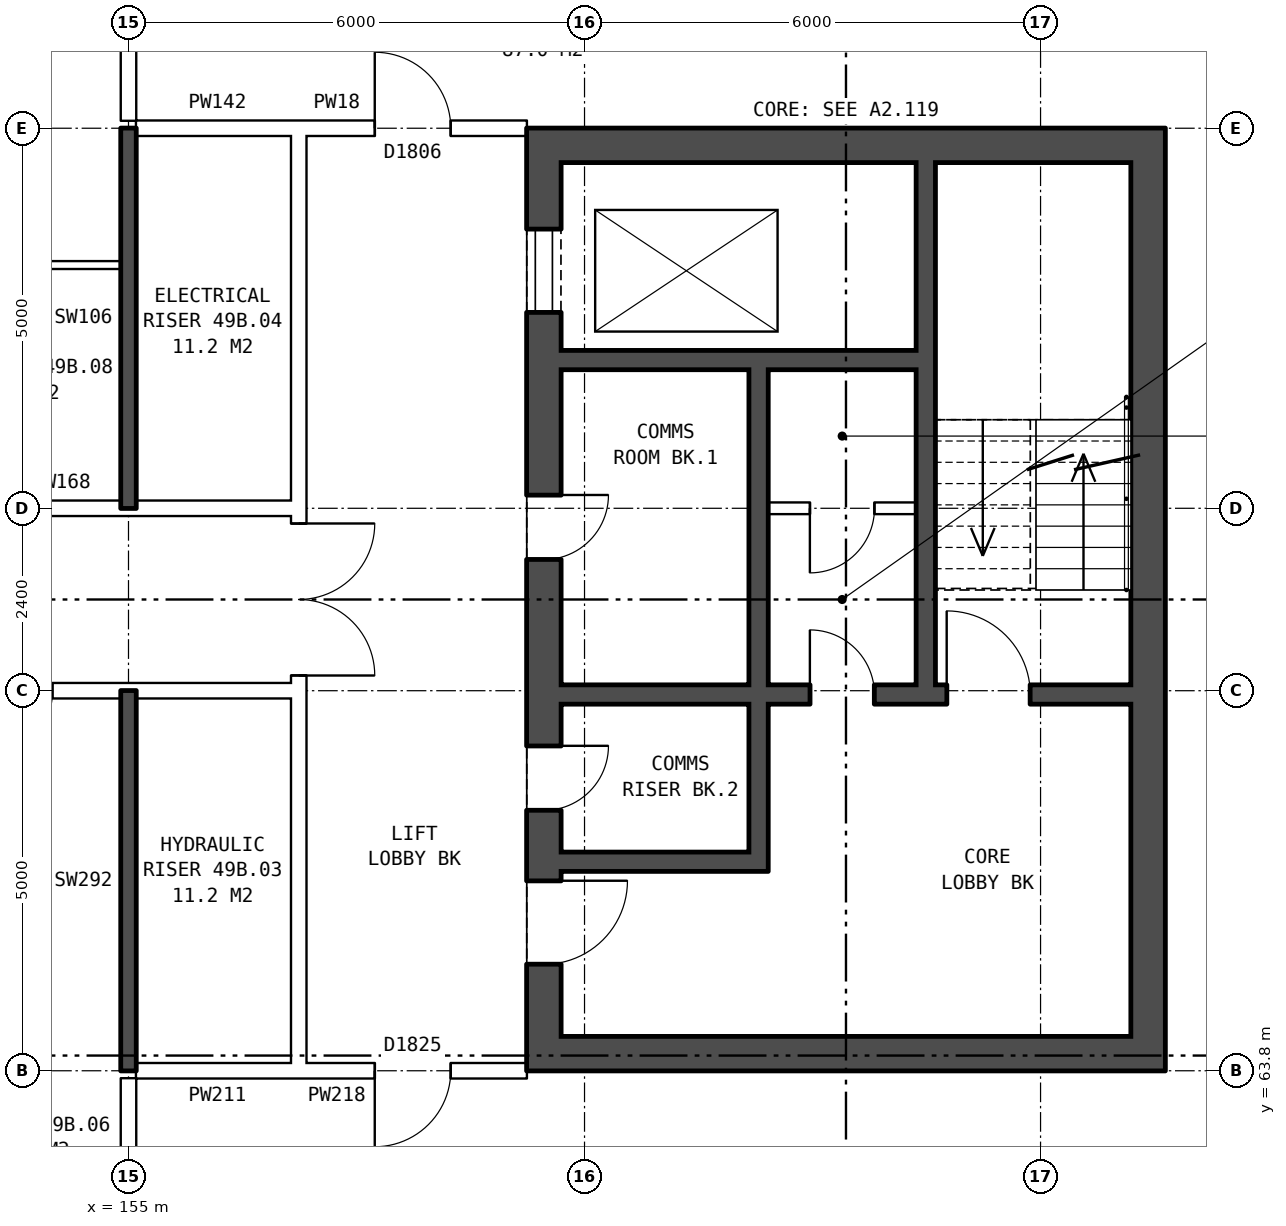
"""IFC4 building model, lengths in metres.
Left out: names, types, materials, properties, quantities, classifications, styles, units other than length and angle.
Written with IfcOpenShell. Run it as: python <this file> out.ifc"""

import sys

from ifc_helpers import new_model, si_unit, direction, frame, frame_2d, origin, place, context, subcontext, project, spatial, rectangle, extrude, element, fill, save


model = new_model("IFC4")
c1 = context("Model", 3, precision=1e-05, world=origin(), true_north=direction((0.0, 1.0)))
c2 = subcontext(c1, "Body", "Model", "MODEL_VIEW")
j1 = project(units=[si_unit("LENGTHUNIT", "METRE"), si_unit("PLANEANGLEUNIT", "RADIAN")], contexts=[c1])
p1 = place(None, origin())
s1 = spatial("IfcSite", under=j1, at=p1, CompositionType="ELEMENT")
p2 = place(p1, origin())
s2 = spatial("IfcBuilding", under=s1, at=p2, CompositionType="ELEMENT")
p3 = place(p2, frame((0.0, 0.0, 175.8)))
s3 = spatial("IfcBuildingStorey", under=s2, at=p3, CompositionType="ELEMENT", Elevation=175.8)
p4 = place(p3, frame((160.465, 76.2, 0.0), z_axis=(0.0, 0.0, 1.0), x_axis=(0.0, -1.0, 0.0)))
e1 = element("IfcWall", 1, at=p4, inside=s3, PredefinedType="SHEAR", context=c2, shape_type="SweptSolid", body=[
    extrude(rectangle(XDim=12.4, YDim=0.45, at=frame_2d((6.2, 0.0))), origin(), (0.0, 0.0, 1.0), 2.85),
])
p5 = place(p4, frame((1.325, 0.0, 0.0)))
e2 = element("IfcOpeningElement", 2, at=p5, cuts=e1, PredefinedType="OPENING", context=c2, shape_type="SweptSolid", body=[
    extrude(rectangle(XDim=1.1, YDim=2.1, at=frame_2d((0.55, 1.05))), frame((0.0, 0.235, 0.0), z_axis=(0.0, -1.0, 0.0), x_axis=(1.0, 0.0, 0.0)), (0.0, 0.0, 1.0), 0.47),
])
p6 = place(p4, frame((4.825, 0.0, 0.0)))
e3 = element("IfcOpeningElement", 3, at=p6, cuts=e1, PredefinedType="OPENING", context=c2, shape_type="SweptSolid", body=[
    extrude(rectangle(XDim=0.85, YDim=2.1, at=frame_2d((0.425, 1.05))), frame((0.0, 0.235, 0.0), z_axis=(0.0, -1.0, 0.0), x_axis=(1.0, 0.0, 0.0)), (0.0, 0.0, 1.0), 0.47),
])
p7 = place(p4, frame((9.9, 0.0, 0.0)))
e4 = element("IfcOpeningElement", 4, at=p7, cuts=e1, PredefinedType="OPENING", context=c2, shape_type="SweptSolid", body=[
    extrude(rectangle(XDim=1.1, YDim=2.1, at=frame_2d((0.55, 1.05))), frame((0.0, 0.235, 0.0), z_axis=(0.0, -1.0, 0.0), x_axis=(1.0, 0.0, 0.0)), (0.0, 0.0, 1.0), 0.47),
])
p8 = place(p4, frame((8.125, 0.0, 0.0)))
e5 = element("IfcOpeningElement", 5, at=p8, cuts=e1, PredefinedType="OPENING", context=c2, shape_type="SweptSolid", body=[
    extrude(rectangle(XDim=0.85, YDim=2.1, at=frame_2d((0.425, 1.05))), frame((0.0, 0.235, 0.0), z_axis=(0.0, -1.0, 0.0), x_axis=(1.0, 0.0, 0.0)), (0.0, 0.0, 1.0), 0.47),
])
p9 = place(p3, frame((168.415, 76.2, 0.0), z_axis=(0.0, 0.0, 1.0), x_axis=(0.0, -1.0, 0.0)))
e6 = element("IfcWall", 6, at=p9, inside=s3, PredefinedType="SHEAR", context=c2, shape_type="SweptSolid", body=[
    extrude(rectangle(XDim=12.4, YDim=0.45, at=frame_2d((6.2, 0.0))), origin(), (0.0, 0.0, 1.0), 2.85),
])
for number, where, z_axis, x_axis in (
    (7, (160.69, 75.975, 0.0), (0.0, 0.0, 1.0), (1.0, 0.0, 0.0)),
    (8, (160.69, 64.025, 0.0), (0.0, 0.0, 1.0), (1.0, 0.0, 0.0)),
):
    element("IfcWall", number, at=place(p3, frame(where, z_axis=z_axis, x_axis=x_axis)), inside=s3, PredefinedType="SHEAR", context=c2, shape_type="SweptSolid", body=[
        extrude(rectangle(XDim=7.5, YDim=0.45, at=frame_2d((3.75, 0.0))), origin(), (0.0, 0.0, 1.0), 2.85),
    ])
p10 = place(p3, frame((160.69, 73.15, 0.0), z_axis=(0.0, 0.0, 1.0), x_axis=(1.0, 0.0, 0.0)))
e9 = element("IfcWall", 9, at=p10, inside=s3, PredefinedType="SHEAR", context=c2, shape_type="SweptSolid", body=[
    extrude(rectangle(XDim=4.675, YDim=0.25, at=frame_2d((2.337, 0.0))), origin(), (0.0, 0.0, 1.0), 2.85),
])
p11 = place(p3, frame((163.415, 71.2, 0.0), z_axis=(0.0, 0.0, 1.0), x_axis=(1.0, 0.0, 0.0)))
e10 = element("IfcWall", 10, at=p11, inside=s3, PredefinedType="PARTITIONING", context=c2, shape_type="SweptSolid", body=[
    extrude(rectangle(XDim=1.95, YDim=0.15, at=frame_2d((0.975, 0.0))), origin(), (0.0, 0.0, 1.0), 2.85),
])
p12 = place(p11, frame((0.55, 0.0, 0.0)))
e11 = element("IfcOpeningElement", 11, at=p12, cuts=e10, PredefinedType="OPENING", context=c2, shape_type="SweptSolid", body=[
    extrude(rectangle(XDim=0.85, YDim=2.1, at=frame_2d((0.425, 1.05))), frame((0.0, 0.085, 0.0), z_axis=(0.0, -1.0, 0.0), x_axis=(1.0, 0.0, 0.0)), (0.0, 0.0, 1.0), 0.17),
])
p13 = place(p3, frame((160.69, 68.75, 0.0), z_axis=(0.0, 0.0, 1.0), x_axis=(1.0, 0.0, 0.0)))
e12 = element("IfcWall", 12, at=p13, inside=s3, PredefinedType="SHEAR", context=c2, shape_type="SweptSolid", body=[
    extrude(rectangle(XDim=7.5, YDim=0.25, at=frame_2d((3.75, 0.0))), origin(), (0.0, 0.0, 1.0), 2.85),
])
p14 = place(p13, frame((5.075, 0.0, 0.0)))
e13 = element("IfcOpeningElement", 13, at=p14, cuts=e12, PredefinedType="OPENING", context=c2, shape_type="SweptSolid", body=[
    extrude(rectangle(XDim=1.1, YDim=2.1, at=frame_2d((0.55, 1.05))), frame((0.0, 0.135, 0.0), z_axis=(0.0, -1.0, 0.0), x_axis=(1.0, 0.0, 0.0)), (0.0, 0.0, 1.0), 0.27),
])
p15 = place(p13, frame((3.275, 0.0, 0.0)))
e14 = element("IfcOpeningElement", 14, at=p15, cuts=e12, PredefinedType="OPENING", context=c2, shape_type="SweptSolid", body=[
    extrude(rectangle(XDim=0.85, YDim=2.1, at=frame_2d((0.425, 1.05))), frame((0.0, 0.135, 0.0), z_axis=(0.0, -1.0, 0.0), x_axis=(1.0, 0.0, 0.0)), (0.0, 0.0, 1.0), 0.27),
])
p16 = place(p3, frame((160.69, 66.55, 0.0), z_axis=(0.0, 0.0, 1.0), x_axis=(1.0, 0.0, 0.0)))
e15 = element("IfcWall", 15, at=p16, inside=s3, PredefinedType="SHEAR", context=c2, shape_type="SweptSolid", body=[
    extrude(rectangle(XDim=2.475, YDim=0.25, at=frame_2d((1.238, 0.0))), origin(), (0.0, 0.0, 1.0), 2.85),
])
p17 = place(p3, frame((163.29, 73.025, 0.0), z_axis=(0.0, 0.0, 1.0), x_axis=(0.0, -1.0, 0.0)))
e16 = element("IfcWall", 16, at=p17, inside=s3, PredefinedType="SHEAR", context=c2, shape_type="SweptSolid", body=[
    extrude(rectangle(XDim=4.15, YDim=0.25, at=frame_2d((2.075, 0.0))), origin(), (0.0, 0.0, 1.0), 2.85),
])
p18 = place(p3, frame((163.29, 68.625, 0.0), z_axis=(0.0, 0.0, 1.0), x_axis=(0.0, -1.0, 0.0)))
e17 = element("IfcWall", 17, at=p18, inside=s3, PredefinedType="SHEAR", context=c2, shape_type="SweptSolid", body=[
    extrude(rectangle(XDim=2.2, YDim=0.25, at=frame_2d((1.1, 0.0))), origin(), (0.0, 0.0, 1.0), 2.85),
])
p19 = place(p3, frame((165.49, 75.75, 0.0), z_axis=(0.0, 0.0, 1.0), x_axis=(0.0, -1.0, 0.0)))
e18 = element("IfcWall", 18, at=p19, inside=s3, PredefinedType="SHEAR", context=c2, shape_type="SweptSolid", body=[
    extrude(rectangle(XDim=6.875, YDim=0.25, at=frame_2d((3.438, 0.0))), origin(), (0.0, 0.0, 1.0), 2.85),
])
p20 = place(p3, frame((157.24, 63.9, 0.0), z_axis=(0.0, 0.0, 1.0), x_axis=(0.0, 1.0, 0.0)))
e19 = element("IfcWall", 19, at=p20, inside=s3, PredefinedType="PARTITIONING", context=c2, shape_type="SweptSolid", body=[
    extrude(rectangle(XDim=12.2, YDim=0.2, at=frame_2d((6.1, 0.0))), origin(), (0.0, 0.0, 1.0), 2.85),
])
p21 = place(p20, frame((5.1, 0.0, 0.0)))
e20 = element("IfcOpeningElement", 20, at=p21, cuts=e19, PredefinedType="OPENING", context=c2, shape_type="SweptSolid", body=[
    extrude(rectangle(XDim=2.0, YDim=2.1, at=frame_2d((1.0, 1.05))), frame((0.0, 0.11, 0.0), z_axis=(0.0, -1.0, 0.0), x_axis=(1.0, 0.0, 0.0)), (0.0, 0.0, 1.0), 0.22),
])
p22 = place(p3, frame((155.1, 63.8, 0.0), z_axis=(0.0, 0.0, 1.0), x_axis=(1.0, 0.0, 0.0)))
e21 = element("IfcWall", 21, at=p22, inside=s3, PredefinedType="PARTITIONING", context=c2, shape_type="SweptSolid", body=[
    extrude(rectangle(XDim=2.14, YDim=0.2, at=frame_2d((1.07, 0.0))), origin(), (0.0, 0.0, 1.0), 2.85),
])
p23 = place(p3, frame((157.24, 63.8, 0.0), z_axis=(0.0, 0.0, 1.0), x_axis=(1.0, 0.0, 0.0)))
e22 = element("IfcWall", 22, at=p23, inside=s3, PredefinedType="PARTITIONING", context=c2, shape_type="SweptSolid", body=[
    extrude(rectangle(XDim=3.0, YDim=0.2, at=frame_2d((1.5, 0.0))), origin(), (0.0, 0.0, 1.0), 2.85),
])
p24 = place(p23, frame((1.0, 0.0, 0.0)))
e23 = element("IfcOpeningElement", 23, at=p24, cuts=e22, PredefinedType="OPENING", context=c2, shape_type="SweptSolid", body=[
    extrude(rectangle(XDim=1.0, YDim=2.1, at=frame_2d((0.5, 1.05))), frame((0.0, 0.11, 0.0), z_axis=(0.0, -1.0, 0.0), x_axis=(1.0, 0.0, 0.0)), (0.0, 0.0, 1.0), 0.22),
])
p25 = place(p3, frame((142.76, 68.8, 0.0), z_axis=(0.0, 0.0, 1.0), x_axis=(1.0, 0.0, 0.0)))
e24 = element("IfcWall", 24, at=p25, inside=s3, PredefinedType="PARTITIONING", context=c2, shape_type="SweptSolid", body=[
    extrude(rectangle(XDim=14.48, YDim=0.2, at=frame_2d((7.24, 0.0))), origin(), (0.0, 0.0, 1.0), 2.85),
])
p26 = place(p25, frame((1.12, 0.0, 0.0)))
e25 = element("IfcOpeningElement", 25, at=p26, cuts=e24, PredefinedType="OPENING", context=c2, shape_type="SweptSolid", body=[
    extrude(rectangle(XDim=1.0, YDim=2.1, at=frame_2d((0.5, 1.05))), frame((0.0, 0.11, 0.0), z_axis=(0.0, -1.0, 0.0), x_axis=(1.0, 0.0, 0.0)), (0.0, 0.0, 1.0), 0.22),
])
p27 = place(p25, frame((10.24, 0.0, 0.0)))
e26 = element("IfcOpeningElement", 26, at=p27, cuts=e24, PredefinedType="OPENING", context=c2, shape_type="SweptSolid", body=[
    extrude(rectangle(XDim=1.0, YDim=2.1, at=frame_2d((0.5, 1.05))), frame((0.0, 0.11, 0.0), z_axis=(0.0, -1.0, 0.0), x_axis=(1.0, 0.0, 0.0)), (0.0, 0.0, 1.0), 0.22),
])
p28 = place(p3, frame((142.76, 71.2, 0.0), z_axis=(0.0, 0.0, 1.0), x_axis=(1.0, 0.0, 0.0)))
e27 = element("IfcWall", 27, at=p28, inside=s3, PredefinedType="PARTITIONING", context=c2, shape_type="SweptSolid", body=[
    extrude(rectangle(XDim=14.48, YDim=0.2, at=frame_2d((7.24, 0.0))), origin(), (0.0, 0.0, 1.0), 2.85),
])
p29 = place(p28, frame((1.12, 0.0, 0.0)))
e28 = element("IfcOpeningElement", 28, at=p29, cuts=e27, PredefinedType="OPENING", context=c2, shape_type="SweptSolid", body=[
    extrude(rectangle(XDim=1.0, YDim=2.1, at=frame_2d((0.5, 1.05))), frame((0.0, 0.11, 0.0), z_axis=(0.0, -1.0, 0.0), x_axis=(1.0, 0.0, 0.0)), (0.0, 0.0, 1.0), 0.22),
])
p30 = place(p28, frame((7.24, 0.0, 0.0)))
e29 = element("IfcOpeningElement", 29, at=p30, cuts=e27, PredefinedType="OPENING", context=c2, shape_type="SweptSolid", body=[
    extrude(rectangle(XDim=1.0, YDim=2.1, at=frame_2d((0.5, 1.05))), frame((0.0, 0.11, 0.0), z_axis=(0.0, -1.0, 0.0), x_axis=(1.0, 0.0, 0.0)), (0.0, 0.0, 1.0), 0.22),
])
p31 = place(p3, frame((152.0, 74.4, 0.0), z_axis=(0.0, 0.0, 1.0), x_axis=(1.0, 0.0, 0.0)))
e30 = element("IfcWall", 30, at=p31, inside=s3, PredefinedType="PARTITIONING", context=c2, shape_type="SweptSolid", body=[
    extrude(rectangle(XDim=2.9, YDim=0.1, at=frame_2d((1.45, 0.0))), origin(), (0.0, 0.0, 1.0), 2.85),
])
p32 = place(p3, frame((155.1, 76.2, 0.0), z_axis=(0.0, 0.0, 1.0), x_axis=(1.0, 0.0, 0.0)))
e31 = element("IfcWall", 31, at=p32, inside=s3, PredefinedType="PARTITIONING", context=c2, shape_type="SweptSolid", body=[
    extrude(rectangle(XDim=2.14, YDim=0.2, at=frame_2d((1.07, 0.0))), origin(), (0.0, 0.0, 1.0), 2.85),
])
p33 = place(p3, frame((157.24, 76.2, 0.0), z_axis=(0.0, 0.0, 1.0), x_axis=(1.0, 0.0, 0.0)))
e32 = element("IfcWall", 32, at=p33, inside=s3, PredefinedType="PARTITIONING", context=c2, shape_type="SweptSolid", body=[
    extrude(rectangle(XDim=3.0, YDim=0.2, at=frame_2d((1.5, 0.0))), origin(), (0.0, 0.0, 1.0), 2.85),
])
p34 = place(p33, frame((1.0, 0.0, 0.0)))
e33 = element("IfcOpeningElement", 33, at=p34, cuts=e32, PredefinedType="OPENING", context=c2, shape_type="SweptSolid", body=[
    extrude(rectangle(XDim=1.0, YDim=2.1, at=frame_2d((0.5, 1.05))), frame((0.0, 0.11, 0.0), z_axis=(0.0, -1.0, 0.0), x_axis=(1.0, 0.0, 0.0)), (0.0, 0.0, 1.0), 0.22),
])
p35 = place(p3, frame((155.0, 61.5, 0.0), z_axis=(0.0, 0.0, 1.0), x_axis=(0.0, 1.0, 0.0)))
e34 = element("IfcWall", 34, at=p35, inside=s3, PredefinedType="PARTITIONING", context=c2, shape_type="SweptSolid", body=[
    extrude(rectangle(XDim=2.2, YDim=0.2, at=frame_2d((1.1, 0.0))), origin(), (0.0, 0.0, 1.0), 2.85),
])
for number, where, z_axis, x_axis in (
    (35, (155.0, 63.8, 0.0), (0.0, 0.0, 1.0), (0.0, 1.0, 0.0)),
    (36, (155.0, 71.2, 0.0), (0.0, 0.0, 1.0), (0.0, 1.0, 0.0)),
):
    element("IfcWall", number, at=place(p3, frame(where, z_axis=z_axis, x_axis=x_axis)), inside=s3, PredefinedType="SOLIDWALL", context=c2, shape_type="SweptSolid", body=[
        extrude(rectangle(XDim=5.0, YDim=0.2, at=frame_2d((2.5, 0.0))), origin(), (0.0, 0.0, 1.0), 2.85),
    ])
p36 = place(p3, frame((155.0, 76.3, 0.0), z_axis=(0.0, 0.0, 1.0), x_axis=(0.0, 1.0, 0.0)))
e37 = element("IfcWall", 37, at=p36, inside=s3, PredefinedType="PARTITIONING", context=c2, shape_type="SweptSolid", body=[
    extrude(rectangle(XDim=2.2, YDim=0.2, at=frame_2d((1.1, 0.0))), origin(), (0.0, 0.0, 1.0), 2.85),
])
p37 = place(p5, origin())
e38 = element("IfcDoor", 38, at=p37, inside=s3, OperationType="DOUBLE_DOOR_SLIDING", PredefinedType="DOOR", context=c2, shape_type="SweptSolid", body=[
    extrude(rectangle(XDim=1.1, YDim=2.1, at=frame_2d((0.55, 1.05))), frame((0.0, 0.21, 0.0), z_axis=(0.0, -1.0, 0.0), x_axis=(1.0, 0.0, 0.0)), (0.0, 0.0, 1.0), 0.05),
])
fill(e2, e38)
p38 = place(p6, origin())
e39 = element("IfcDoor", 39, at=p38, inside=s3, OperationType="SINGLE_SWING_LEFT", PredefinedType="DOOR", context=c2, shape_type="SweptSolid", body=[
    extrude(rectangle(XDim=0.85, YDim=2.1, at=frame_2d((0.425, 1.05))), frame((0.0, 0.21, 0.0), z_axis=(0.0, -1.0, 0.0), x_axis=(1.0, 0.0, 0.0)), (0.0, 0.0, 1.0), 0.05),
])
fill(e3, e39)
p39 = place(p7, origin())
e40 = element("IfcDoor", 40, at=p39, inside=s3, OperationType="SINGLE_SWING_LEFT", PredefinedType="DOOR", context=c2, shape_type="SweptSolid", body=[
    extrude(rectangle(XDim=1.1, YDim=2.1, at=frame_2d((0.55, 1.05))), frame((0.0, 0.21, 0.0), z_axis=(0.0, -1.0, 0.0), x_axis=(1.0, 0.0, 0.0)), (0.0, 0.0, 1.0), 0.05),
])
fill(e4, e40)
p40 = place(p14, origin())
e41 = element("IfcDoor", 41, at=p40, inside=s3, OperationType="SINGLE_SWING_LEFT", PredefinedType="DOOR", context=c2, shape_type="SweptSolid", body=[
    extrude(rectangle(XDim=1.1, YDim=2.1, at=frame_2d((0.55, 1.05))), frame((0.0, 0.025, 0.0), z_axis=(0.0, -1.0, 0.0), x_axis=(1.0, 0.0, 0.0)), (0.0, 0.0, 1.0), 0.05),
])
fill(e13, e41)
p41 = place(p8, origin())
e42 = element("IfcDoor", 42, at=p41, inside=s3, OperationType="SINGLE_SWING_LEFT", PredefinedType="DOOR", context=c2, shape_type="SweptSolid", body=[
    extrude(rectangle(XDim=0.85, YDim=2.1, at=frame_2d((0.425, 1.05))), frame((0.0, 0.21, 0.0), z_axis=(0.0, -1.0, 0.0), x_axis=(1.0, 0.0, 0.0)), (0.0, 0.0, 1.0), 0.05),
])
fill(e5, e42)
p42 = place(p15, origin())
e43 = element("IfcDoor", 43, at=p42, inside=s3, OperationType="SINGLE_SWING_LEFT", PredefinedType="DOOR", context=c2, shape_type="SweptSolid", body=[
    extrude(rectangle(XDim=0.85, YDim=2.1, at=frame_2d((0.425, 1.05))), frame((0.0, 0.025, 0.0), z_axis=(0.0, -1.0, 0.0), x_axis=(1.0, 0.0, 0.0)), (0.0, 0.0, 1.0), 0.05),
])
fill(e14, e43)
p43 = place(p12, frame((0.85, 0.0, 0.0), z_axis=(0.0, 0.0, 1.0), x_axis=(-1.0, 0.0, 0.0)))
e44 = element("IfcDoor", 44, at=p43, inside=s3, OperationType="SINGLE_SWING_RIGHT", PredefinedType="DOOR", context=c2, shape_type="SweptSolid", body=[
    extrude(rectangle(XDim=0.85, YDim=2.1, at=frame_2d((0.425, 1.05))), frame((0.0, 0.025, 0.0), z_axis=(0.0, -1.0, 0.0), x_axis=(1.0, 0.0, 0.0)), (0.0, 0.0, 1.0), 0.05),
])
fill(e11, e44)
p44 = place(p21, frame((2.0, 0.0, 0.0), z_axis=(0.0, 0.0, 1.0), x_axis=(-1.0, 0.0, 0.0)))
e45 = element("IfcDoor", 45, at=p44, inside=s3, OperationType="DOUBLE_DOOR_SINGLE_SWING", PredefinedType="DOOR", context=c2, shape_type="SweptSolid", body=[
    extrude(rectangle(XDim=2.0, YDim=2.1, at=frame_2d((1.0, 1.05))), frame((0.0, 0.025, 0.0), z_axis=(0.0, -1.0, 0.0), x_axis=(1.0, 0.0, 0.0)), (0.0, 0.0, 1.0), 0.05),
])
fill(e20, e45)
p45 = place(p24, frame((1.0, 0.0, 0.0), z_axis=(0.0, 0.0, 1.0), x_axis=(-1.0, 0.0, 0.0)))
e46 = element("IfcDoor", 46, at=p45, inside=s3, OperationType="SINGLE_SWING_RIGHT", PredefinedType="DOOR", context=c2, shape_type="SweptSolid", body=[
    extrude(rectangle(XDim=1.0, YDim=2.1, at=frame_2d((0.5, 1.05))), frame((0.0, 0.025, 0.0), z_axis=(0.0, -1.0, 0.0), x_axis=(1.0, 0.0, 0.0)), (0.0, 0.0, 1.0), 0.05),
])
fill(e23, e46)
p46 = place(p34, origin())
e47 = element("IfcDoor", 47, at=p46, inside=s3, OperationType="SINGLE_SWING_LEFT", PredefinedType="DOOR", context=c2, shape_type="SweptSolid", body=[
    extrude(rectangle(XDim=1.0, YDim=2.1, at=frame_2d((0.5, 1.05))), frame((0.0, 0.025, 0.0), z_axis=(0.0, -1.0, 0.0), x_axis=(1.0, 0.0, 0.0)), (0.0, 0.0, 1.0), 0.05),
])
fill(e33, e47)
save(model, sys.argv[1])
